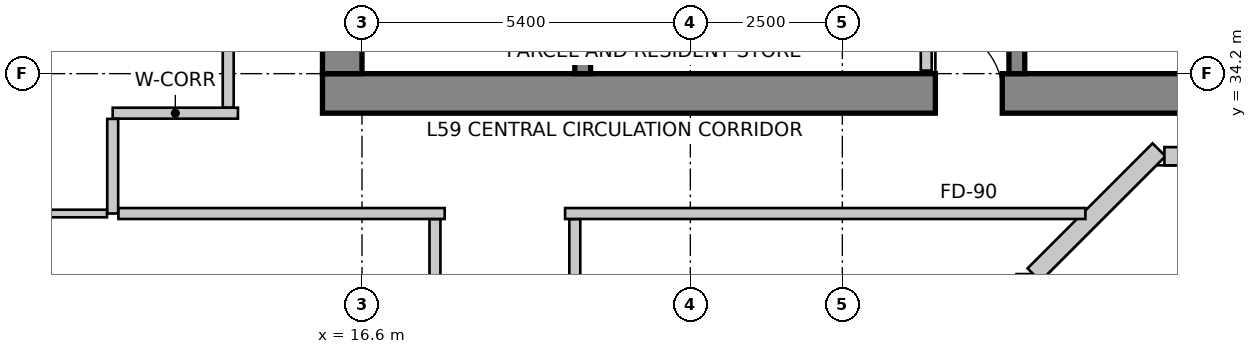
"""IFC4 building model, lengths in metres.
Left out: names, types, materials, properties, quantities, classifications, styles, units other than length and angle.
Written with IfcOpenShell. Run it as: python <this file> out.ifc"""

import sys

from ifc_helpers import new_model, si_unit, direction, frame, frame_2d, origin, place, context, subcontext, project, spatial, rectangle, extrude, source, transform, mapped, element, fill, save


model = new_model("IFC4")
c1 = context("Model", 3, precision=1e-05, world=origin(), true_north=direction((0.0, 1.0)))
c2 = subcontext(c1, "Body", "Model", "MODEL_VIEW")
j1 = project(units=[si_unit("LENGTHUNIT", "METRE"), si_unit("PLANEANGLEUNIT", "RADIAN")], contexts=[c1])
p1 = place(None, origin())
s1 = spatial("IfcSite", under=j1, at=p1, CompositionType="ELEMENT")
p2 = place(p1, origin())
s2 = spatial("IfcBuilding", under=s1, at=p2, CompositionType="ELEMENT")
p3 = place(p2, frame((0.0, 0.0, 232.4)))
s3 = spatial("IfcBuildingStorey", under=s2, at=p3, CompositionType="ELEMENT", Elevation=232.4)
p4 = place(p3, frame((15.95, 33.875, 0.0), z_axis=(0.0, 0.0, 1.0), x_axis=(1.0, 0.0, 0.0)))
e1 = element("IfcWall", 1, at=p4, inside=s3, PredefinedType="SHEAR", context=c2, shape_type="SweptSolid", body=[
    extrude(rectangle(XDim=15.7, YDim=0.65, at=frame_2d((7.85, 0.0))), origin(), (0.0, 0.0, 1.0), 3.5),
])
m1 = source(origin(), c2, "Body", "SweptSolid", [
    extrude(rectangle(XDim=1.1, YDim=2.15, at=frame_2d((0.55, 1.075))), frame((0.0, 0.335, 0.0), z_axis=(0.0, -1.0, 0.0), x_axis=(1.0, 0.0, 0.0)), (0.0, 0.0, 1.0), 0.67),
])
p5 = place(p4, frame((10.08, 0.0, 0.0)))
e2 = element("IfcOpeningElement", 2, at=p5, cuts=e1, PredefinedType="OPENING", context=c2, shape_type="MappedRepresentation", body=[
    mapped(m1, transform((0.0, 0.0, 0.0), scale=1.0)),
])
p6 = place(p3, frame((16.275, 34.2, 0.0), z_axis=(0.0, 0.0, 1.0), x_axis=(0.0, 1.0, 0.0)))
e3 = element("IfcWall", 3, at=p6, inside=s3, PredefinedType="SHEAR", context=c2, shape_type="SweptSolid", body=[
    extrude(rectangle(XDim=11.4, YDim=0.65, at=frame_2d((5.7, 0.0))), origin(), (0.0, 0.0, 1.0), 3.5),
])
p7 = place(p6, frame((7.15, 0.0, 0.0)))
e4 = element("IfcOpeningElement", 4, at=p7, cuts=e3, PredefinedType="OPENING", context=c2, shape_type="MappedRepresentation", body=[
    mapped(m1, transform((0.0, 0.0, 0.0), scale=1.0)),
])
p8 = place(p3, frame((20.23, 34.2, 0.0), z_axis=(0.0, 0.0, 1.0), x_axis=(0.0, 1.0, 0.0)))
e5 = element("IfcWall", 5, at=p8, inside=s3, PredefinedType="SHEAR", context=c2, shape_type="SweptSolid", body=[
    extrude(rectangle(XDim=9.06, YDim=0.26, at=frame_2d((4.53, 0.0))), origin(), (0.0, 0.0, 1.0), 3.5),
])
m2 = source(origin(), c2, "Body", "SweptSolid", [
    extrude(rectangle(XDim=1.1, YDim=2.15, at=frame_2d((0.55, 1.075))), frame((0.0, 0.14, 0.0), z_axis=(0.0, -1.0, 0.0), x_axis=(1.0, 0.0, 0.0)), (0.0, 0.0, 1.0), 0.28),
])
p9 = place(p8, frame((7.45, 0.0, 0.0)))
e6 = element("IfcOpeningElement", 6, at=p9, cuts=e5, PredefinedType="OPENING", context=c2, shape_type="MappedRepresentation", body=[
    mapped(m2, transform((0.0, 0.0, 0.0), scale=1.0)),
])
p10 = place(p3, frame((27.37, 34.2, 0.0), z_axis=(0.0, 0.0, 1.0), x_axis=(0.0, 1.0, 0.0)))
e7 = element("IfcWall", 7, at=p10, inside=s3, PredefinedType="SHEAR", context=c2, shape_type="SweptSolid", body=[
    extrude(rectangle(XDim=9.06, YDim=0.26, at=frame_2d((4.53, 0.0))), origin(), (0.0, 0.0, 1.0), 3.5),
])
p11 = place(p10, frame((7.45, 0.0, 0.0)))
e8 = element("IfcOpeningElement", 8, at=p11, cuts=e7, PredefinedType="OPENING", context=c2, shape_type="MappedRepresentation", body=[
    mapped(m2, transform((0.0, 0.0, 0.0), scale=1.0)),
])
p12 = place(p3, frame((27.514, 29.677, 0.0), z_axis=(0.0, 0.0, 1.0), x_axis=(0.0, 1.0, 0.0)))
e9 = element("IfcWall", 9, at=p12, inside=s3, PredefinedType="SOLIDWALL", context=c2, shape_type="SweptSolid", body=[
    extrude(rectangle(XDim=1.228, YDim=0.3, at=frame_2d((0.614, 0.0))), origin(), (0.0, 0.0, 1.0), 3.25),
])
p13 = place(p3, frame((27.652, 30.892, 0.0), z_axis=(0.0, 0.0, 1.0), x_axis=(0.707106781187, 0.707106781187, 0.0)))
e10 = element("IfcWall", 10, at=p13, inside=s3, PredefinedType="SOLIDWALL", context=c2, shape_type="SweptSolid", body=[
    extrude(rectangle(XDim=2.907, YDim=0.3, at=frame_2d((1.454, 0.0))), origin(), (0.0, 0.0, 1.0), 3.25),
])
p14 = place(p3, frame((29.797, 32.842, 0.0), z_axis=(0.0, 0.0, 1.0), x_axis=(1.0, 0.0, 0.0)))
e11 = element("IfcWall", 11, at=p14, inside=s3, PredefinedType="SOLIDWALL", context=c2, shape_type="SweptSolid", body=[
    extrude(rectangle(XDim=12.491, YDim=0.3, at=frame_2d((6.245, 0.0))), origin(), (0.0, 0.0, 1.0), 3.25),
])
m3 = source(origin(), c2, "Body", "SweptSolid", [
    extrude(rectangle(XDim=1.6, YDim=2.15, at=frame_2d((0.8, 1.075))), frame((0.0, 0.16, 0.0), z_axis=(0.0, -1.0, 0.0), x_axis=(1.0, 0.0, 0.0)), (0.0, 0.0, 1.0), 0.32),
])
p15 = place(p14, frame((4.403, 0.0, 0.0)))
e12 = element("IfcOpeningElement", 12, at=p15, cuts=e11, PredefinedType="OPENING", context=c2, shape_type="MappedRepresentation", body=[
    mapped(m3, transform((0.0, 0.0, 0.0), scale=1.0)),
])
m4 = source(origin(), c2, "Body", "SweptSolid", [
    extrude(rectangle(XDim=2.1, YDim=2.0, at=frame_2d((1.05, 1.0))), frame((0.0, 0.16, 0.0), z_axis=(0.0, -1.0, 0.0), x_axis=(1.0, 0.0, 0.0)), (0.0, 0.0, 1.0), 0.32),
])
p16 = place(p14, frame((1.171, 0.0, 0.85)))
e13 = element("IfcOpeningElement", 13, at=p16, cuts=e11, PredefinedType="OPENING", context=c2, shape_type="MappedRepresentation", body=[
    mapped(m4, transform((0.0, 0.0, 0.0), scale=1.0)),
])
p17 = place(p14, frame((8.177, 0.0, 0.85)))
e14 = element("IfcOpeningElement", 14, at=p17, cuts=e11, PredefinedType="OPENING", context=c2, shape_type="MappedRepresentation", body=[
    mapped(m4, transform((0.0, 0.0, 0.0), scale=1.0)),
])
p18 = place(p3, frame((13.269, 47.134, 0.0), z_axis=(0.0, 0.0, 1.0), x_axis=(-0.319920776449, -0.947444297464, 0.0)))
e15 = element("IfcWall", 15, at=p18, inside=s3, PredefinedType="SOLIDWALL", context=c2, shape_type="SweptSolid", body=[
    extrude(rectangle(XDim=16.133, YDim=0.3, at=frame_2d((8.067, 0.0))), origin(), (0.0, 0.0, 1.0), 3.25),
])
p19 = place(p18, frame((2.513, 0.0, 0.85)))
e16 = element("IfcOpeningElement", 16, at=p19, cuts=e15, PredefinedType="OPENING", context=c2, shape_type="MappedRepresentation", body=[
    mapped(m4, transform((0.0, 0.0, 0.0), scale=1.0)),
])
m5 = source(origin(), c2, "Body", "SweptSolid", [
    extrude(rectangle(XDim=2.4, YDim=2.2, at=frame_2d((1.2, 1.1))), frame((0.0, 0.16, 0.0), z_axis=(0.0, -1.0, 0.0), x_axis=(1.0, 0.0, 0.0)), (0.0, 0.0, 1.0), 0.32),
])
p20 = place(p18, frame((7.26, 0.0, 0.85)))
e17 = element("IfcOpeningElement", 17, at=p20, cuts=e15, PredefinedType="OPENING", context=c2, shape_type="MappedRepresentation", body=[
    mapped(m5, transform((0.0, 0.0, 0.0), scale=1.0)),
])
p21 = place(p18, frame((12.307, 0.0, 0.85)))
e18 = element("IfcOpeningElement", 18, at=p21, cuts=e15, PredefinedType="OPENING", context=c2, shape_type="MappedRepresentation", body=[
    mapped(m4, transform((0.0, 0.0, 0.0), scale=1.0)),
])
p22 = place(p3, frame((8.188, 31.834, 0.0), z_axis=(0.0, 0.0, 1.0), x_axis=(0.202303475707, -0.979322880217, 0.0)))
e19 = element("IfcWall", 19, at=p22, inside=s3, PredefinedType="SOLIDWALL", context=c2, shape_type="SweptSolid", body=[
    extrude(rectangle(XDim=15.766, YDim=0.3, at=frame_2d((7.883, 0.0))), origin(), (0.0, 0.0, 1.0), 3.25),
])
p23 = place(p22, frame((1.473, 0.0, 0.85)))
e20 = element("IfcOpeningElement", 20, at=p23, cuts=e19, PredefinedType="OPENING", context=c2, shape_type="MappedRepresentation", body=[
    mapped(m5, transform((0.0, 0.0, 0.0), scale=1.0)),
])
p24 = place(p22, frame((6.33, 0.0, 0.85)))
e21 = element("IfcOpeningElement", 21, at=p24, cuts=e19, PredefinedType="OPENING", context=c2, shape_type="MappedRepresentation", body=[
    mapped(m4, transform((0.0, 0.0, 0.0), scale=1.0)),
])
p25 = place(p22, frame((10.887, 0.0, 0.85)))
e22 = element("IfcOpeningElement", 22, at=p25, cuts=e19, PredefinedType="OPENING", context=c2, shape_type="MappedRepresentation", body=[
    mapped(m5, transform((0.0, 0.0, 0.0), scale=1.0)),
])
p26 = place(p3, frame((25.88, 35.956, 0.0), z_axis=(0.0, 0.0, 1.0), x_axis=(0.0, -1.0, 0.0)))
e23 = element("IfcWall", 23, at=p26, inside=s3, PredefinedType="PARTITIONING", context=c2, shape_type="SweptSolid", body=[
    extrude(rectangle(XDim=1.706, YDim=0.18, at=frame_2d((0.853, 0.0))), origin(), (0.0, 0.0, 1.0), 2.542),
])
p27 = place(p3, frame((12.5, 33.55, 0.0), z_axis=(0.0, 0.0, 1.0), x_axis=(1.0, 0.0, 0.0)))
e24 = element("IfcWall", 24, at=p27, inside=s3, PredefinedType="PARTITIONING", context=c2, shape_type="SweptSolid", body=[
    extrude(rectangle(XDim=2.06, YDim=0.18, at=frame_2d((1.03, 0.0))), origin(), (0.0, 0.0, 1.0), 3.25),
])
p28 = place(p3, frame((12.5, 31.9, 0.0), z_axis=(0.0, 0.0, 1.0), x_axis=(0.0, 1.0, 0.0)))
e25 = element("IfcWall", 25, at=p28, inside=s3, PredefinedType="PARTITIONING", context=c2, shape_type="SweptSolid", body=[
    extrude(rectangle(XDim=1.556, YDim=0.18, at=frame_2d((0.778, 0.0))), origin(), (0.0, 0.0, 1.0), 2.934),
])
p29 = place(p3, frame((17.96, 31.9, 0.0), z_axis=(0.0, 0.0, 1.0), x_axis=(-1.0, 0.0, 0.0)))
e26 = element("IfcWall", 26, at=p29, inside=s3, PredefinedType="PARTITIONING", context=c2, shape_type="SweptSolid", body=[
    extrude(rectangle(XDim=5.366, YDim=0.18, at=frame_2d((2.683, 0.0))), origin(), (0.0, 0.0, 1.0), 2.934),
])
p30 = place(p3, frame((28.497, 31.9, 0.0), z_axis=(0.0, 0.0, 1.0), x_axis=(-1.0, 0.0, 0.0)))
e27 = element("IfcWall", 27, at=p30, inside=s3, PredefinedType="PARTITIONING", context=c2, shape_type="SweptSolid", body=[
    extrude(rectangle(XDim=8.557, YDim=0.18, at=frame_2d((4.279, 0.0))), origin(), (0.0, 0.0, 1.0), 2.934),
])
p31 = place(p3, frame((14.4, 33.644, 0.0), z_axis=(0.0, 0.0, 1.0), x_axis=(0.0, 1.0, 0.0)))
e28 = element("IfcWall", 28, at=p31, inside=s3, PredefinedType="PARTITIONING", context=c2, shape_type="SweptSolid", body=[
    extrude(rectangle(XDim=12.606, YDim=0.18, at=frame_2d((6.303, 0.0))), origin(), (0.0, 0.0, 1.0), 3.25),
])
m6 = source(origin(), c2, "Body", "SweptSolid", [
    extrude(rectangle(XDim=0.9, YDim=2.15, at=frame_2d((0.45, 1.075))), frame((0.0, 0.1, 0.0), z_axis=(0.0, -1.0, 0.0), x_axis=(1.0, 0.0, 0.0)), (0.0, 0.0, 1.0), 0.2),
])
p32 = place(p31, frame((4.399, 0.0, 0.0)))
e29 = element("IfcOpeningElement", 29, at=p32, cuts=e28, PredefinedType="OPENING", context=c2, shape_type="MappedRepresentation", body=[
    mapped(m6, transform((0.0, 0.0, 0.0), scale=1.0)),
])
p33 = place(p3, frame((12.406, 31.9, 0.0), z_axis=(0.0, 0.0, 1.0), x_axis=(-1.0, 0.0, 0.0)))
e30 = element("IfcWall", 30, at=p33, inside=s3, PredefinedType="PARTITIONING", context=c2, shape_type="SweptSolid", body=[
    extrude(rectangle(XDim=4.115, YDim=0.125, at=frame_2d((2.057, 0.0))), origin(), (0.0, 0.0, 1.0), 2.542),
])
p34 = place(p3, frame((17.8, 17.5, 0.0), z_axis=(0.0, 0.0, 1.0), x_axis=(0.0, 1.0, 0.0)))
e31 = element("IfcWall", 31, at=p34, inside=s3, PredefinedType="PARTITIONING", context=c2, shape_type="SweptSolid", body=[
    extrude(rectangle(XDim=14.306, YDim=0.18, at=frame_2d((7.153, 0.0))), origin(), (0.0, 0.0, 1.0), 2.766),
])
p35 = place(p34, frame((6.643, 0.0, 0.0)))
e32 = element("IfcOpeningElement", 32, at=p35, cuts=e31, PredefinedType="OPENING", context=c2, shape_type="MappedRepresentation", body=[
    mapped(m6, transform((0.0, 0.0, 0.0), scale=1.0)),
])
p36 = place(p3, frame((20.1, 31.806, 0.0), z_axis=(0.0, 0.0, 1.0), x_axis=(0.0, -1.0, 0.0)))
e33 = element("IfcWall", 33, at=p36, inside=s3, PredefinedType="PARTITIONING", context=c2, shape_type="SweptSolid", body=[
    extrude(rectangle(XDim=14.306, YDim=0.18, at=frame_2d((7.153, 0.0))), origin(), (0.0, 0.0, 1.0), 2.766),
])
p37 = place(p36, frame((6.643, 0.0, 0.0)))
e34 = element("IfcOpeningElement", 34, at=p37, cuts=e33, PredefinedType="OPENING", context=c2, shape_type="MappedRepresentation", body=[
    mapped(m6, transform((0.0, 0.0, 0.0), scale=1.0)),
])
m7 = source(origin(), c2, "Body", "SweptSolid", [
    extrude(rectangle(XDim=1.1, YDim=2.15, at=frame_2d((0.55, 1.075))), frame((0.0, 0.025, 0.0), z_axis=(0.0, -1.0, 0.0), x_axis=(1.0, 0.0, 0.0)), (0.0, 0.0, 1.0), 0.05),
])
p38 = place(p5, origin())
e35 = element("IfcDoor", 35, at=p38, inside=s3, OperationType="SINGLE_SWING_LEFT", PredefinedType="DOOR", context=c2, shape_type="MappedRepresentation", body=[
    mapped(m7, transform((0.0, 0.0, 0.0), scale=1.0)),
])
fill(e2, e35)
save(model, sys.argv[1])
